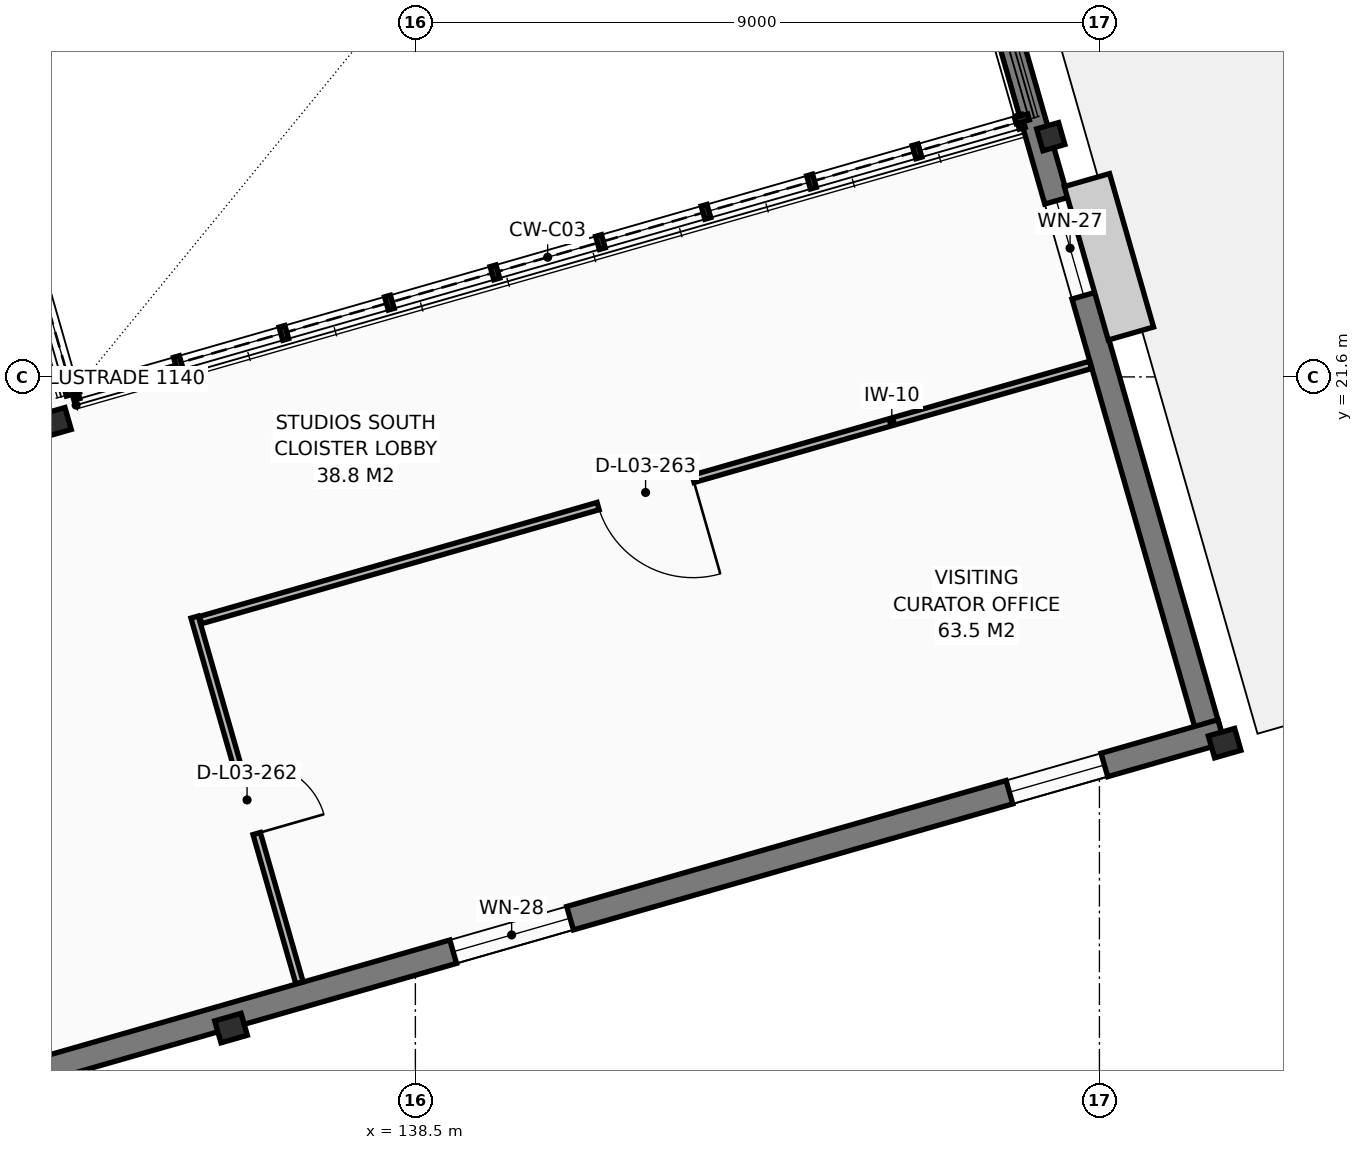
"""IFC4 building model, lengths in metres.
Left out: names, types, materials, properties, quantities, classifications, styles, units other than length and angle.
Written with IfcOpenShell. Run it as: python <this file> out.ifc"""

import sys

from ifc_helpers import new_model, si_unit, direction, frame, frame_2d, origin, origin_2d, place, context, subcontext, project, spatial, rectangle, i_section, extrude, element, fill, save


model = new_model("IFC4")
c1 = context("Model", 3, precision=1e-05, world=origin(), true_north=direction((0.0, 1.0)))
c2 = subcontext(c1, "Body", "Model", "MODEL_VIEW")
j1 = project(units=[si_unit("LENGTHUNIT", "METRE"), si_unit("PLANEANGLEUNIT", "RADIAN")], contexts=[c1])
p1 = place(None, origin())
s1 = spatial("IfcSite", under=j1, at=p1, CompositionType="ELEMENT")
p2 = place(p1, origin())
s2 = spatial("IfcBuilding", under=s1, at=p2, CompositionType="ELEMENT")
p3 = place(p2, frame((0.0, 0.0, 13.68)))
s3 = spatial("IfcBuildingStorey", under=s2, at=p3, CompositionType="ELEMENT", Elevation=13.68)
p4 = place(p3, frame((136.074, 13.033, 0.0), z_axis=(0.0, 0.0, 1.0), x_axis=(0.961261695938, 0.275637355817, 0.0)))
e1 = element("IfcColumn", 1, at=p4, inside=s3, PredefinedType="COLUMN", context=c2, shape_type="SweptSolid", body=[
    extrude(i_section(OverallWidth=0.3, OverallDepth=0.36, WebThickness=0.012, FlangeThickness=0.022, FilletRadius=0.027, at=origin_2d()), origin(), (0.0, 0.0, 1.0), 3.96),
])
p5 = place(p3, frame((133.787, 21.012, 0.0), z_axis=(0.0, 0.0, 1.0), x_axis=(0.961261695938, 0.275637355817, 0.0)))
e2 = element("IfcColumn", 2, at=p5, inside=s3, PredefinedType="COLUMN", context=c2, shape_type="SweptSolid", body=[
    extrude(i_section(OverallWidth=0.3, OverallDepth=0.3, WebThickness=0.011, FlangeThickness=0.019, FilletRadius=0.027, at=origin_2d()), origin(), (0.0, 0.0, 1.0), 3.96),
])
p6 = place(p3, frame((149.147, 16.782, 0.0), z_axis=(0.0, 0.0, 1.0), x_axis=(0.961261695938, 0.275637355817, 0.0)))
e3 = element("IfcColumn", 3, at=p6, inside=s3, PredefinedType="COLUMN", context=c2, shape_type="SweptSolid", body=[
    extrude(i_section(OverallWidth=0.3, OverallDepth=0.36, WebThickness=0.012, FlangeThickness=0.022, FilletRadius=0.027, at=origin_2d()), origin(), (0.0, 0.0, 1.0), 3.96),
])
p7 = place(p3, frame((146.86, 24.76, 0.0), z_axis=(0.0, 0.0, 1.0), x_axis=(0.961261695938, 0.275637355817, 0.0)))
e4 = element("IfcColumn", 4, at=p7, inside=s3, PredefinedType="COLUMN", context=c2, shape_type="SweptSolid", body=[
    extrude(i_section(OverallWidth=0.3, OverallDepth=0.3, WebThickness=0.011, FlangeThickness=0.019, FilletRadius=0.027, at=origin_2d()), origin(), (0.0, 0.0, 1.0), 3.96),
])
p8 = place(p3, frame((141.772, 41.923, 0.0), z_axis=(0.0, 0.0, 1.0), x_axis=(0.275633622707, -0.961262766383, 0.0)))
e5 = element("IfcWall", 5, at=p8, inside=s3, PredefinedType="SOLIDWALL", context=c2, shape_type="SweptSolid", body=[
    extrude(rectangle(XDim=26.04, YDim=0.32, at=frame_2d((13.02, 0.0))), origin(), (0.0, 0.0, 1.0), 3.72),
])
p9 = place(p8, frame((1.6, 0.0, 0.85)))
e6 = element("IfcOpeningElement", 6, at=p9, cuts=e5, PredefinedType="OPENING", context=c2, shape_type="SweptSolid", body=[
    extrude(rectangle(XDim=1.85, YDim=1.4, at=frame_2d((0.925, 0.7))), frame((0.0, 0.17, 0.0), z_axis=(0.0, -1.0, 0.0), x_axis=(1.0, 0.0, 0.0)), (0.0, 0.0, 1.0), 0.34),
])
p10 = place(p8, frame((13.02, 0.0, 0.85)))
e7 = element("IfcOpeningElement", 7, at=p10, cuts=e5, PredefinedType="OPENING", context=c2, shape_type="SweptSolid", body=[
    extrude(rectangle(XDim=2.25, YDim=1.4, at=frame_2d((1.125, 0.7))), frame((0.0, 0.17, 0.0), z_axis=(0.0, -1.0, 0.0), x_axis=(1.0, 0.0, 0.0)), (0.0, 0.0, 1.0), 0.34),
])
p11 = place(p8, frame((18.73, 0.0, 0.85)))
e8 = element("IfcOpeningElement", 8, at=p11, cuts=e5, PredefinedType="OPENING", context=c2, shape_type="SweptSolid", body=[
    extrude(rectangle(XDim=1.3, YDim=1.6, at=frame_2d((0.65, 0.8))), frame((0.0, 0.17, 0.0), z_axis=(0.0, -1.0, 0.0), x_axis=(1.0, 0.0, 0.0)), (0.0, 0.0, 1.0), 0.34),
])
p12 = place(p3, frame((149.103, 16.936, 0.0), z_axis=(0.0, 0.0, 1.0), x_axis=(-0.961262224101, -0.275635513888, 0.0)))
e9 = element("IfcWall", 9, at=p12, inside=s3, PredefinedType="SOLIDWALL", context=c2, shape_type="SweptSolid", body=[
    extrude(rectangle(XDim=25.14, YDim=0.32, at=frame_2d((12.57, 0.0))), origin(), (0.0, 0.0, 1.0), 3.72),
])
p13 = place(p12, frame((1.6, 0.0, 0.85)))
e10 = element("IfcOpeningElement", 10, at=p13, cuts=e9, PredefinedType="OPENING", context=c2, shape_type="SweptSolid", body=[
    extrude(rectangle(XDim=1.3, YDim=1.6, at=frame_2d((0.65, 0.8))), frame((0.0, 0.17, 0.0), z_axis=(0.0, -1.0, 0.0), x_axis=(1.0, 0.0, 0.0)), (0.0, 0.0, 1.0), 0.34),
])
p14 = place(p12, frame((8.913, 0.0, 0.85)))
e11 = element("IfcOpeningElement", 11, at=p14, cuts=e9, PredefinedType="OPENING", context=c2, shape_type="SweptSolid", body=[
    extrude(rectangle(XDim=1.6, YDim=1.6, at=frame_2d((0.8, 0.8))), frame((0.0, 0.17, 0.0), z_axis=(0.0, -1.0, 0.0), x_axis=(1.0, 0.0, 0.0)), (0.0, 0.0, 1.0), 0.34),
])
p15 = place(p12, frame((16.227, 0.0, 0.85)))
e12 = element("IfcOpeningElement", 12, at=p15, cuts=e9, PredefinedType="OPENING", context=c2, shape_type="SweptSolid", body=[
    extrude(rectangle(XDim=1.9, YDim=1.6, at=frame_2d((0.95, 0.8))), frame((0.0, 0.17, 0.0), z_axis=(0.0, -1.0, 0.0), x_axis=(1.0, 0.0, 0.0)), (0.0, 0.0, 1.0), 0.34),
])
p16 = place(p3, frame((135.595, 18.441, 0.0), z_axis=(0.0, 0.0, 1.0), x_axis=(0.275635629977, -0.961262190813, 0.0)))
e13 = element("IfcWall", 13, at=p16, inside=s3, PredefinedType="PARTITIONING", context=c2, shape_type="SweptSolid", body=[
    extrude(rectangle(XDim=5.006, YDim=0.1, at=frame_2d((2.503, 0.0))), origin(), (0.0, 0.0, 1.0), 3.71),
])
p17 = place(p16, frame((2.043, 0.0, 0.0)))
e14 = element("IfcOpeningElement", 14, at=p17, cuts=e13, PredefinedType="OPENING", context=c2, shape_type="SweptSolid", body=[
    extrude(rectangle(XDim=0.92, YDim=2.08, at=frame_2d((0.46, 1.04))), frame((0.0, 0.06, 0.0), z_axis=(0.0, -1.0, 0.0), x_axis=(1.0, 0.0, 0.0)), (0.0, 0.0, 1.0), 0.12),
])
p18 = place(p3, frame((147.383, 21.758, 0.0), z_axis=(0.0, 0.0, 1.0), x_axis=(-0.961263335306, -0.275631638597, 0.0)))
e15 = element("IfcWall", 15, at=p18, inside=s3, PredefinedType="PARTITIONING", context=c2, shape_type="SweptSolid", body=[
    extrude(rectangle(XDim=12.181, YDim=0.1, at=frame_2d((6.09, 0.0))), origin(), (0.0, 0.0, 1.0), 3.4),
])
p19 = place(p18, frame((5.44, 0.0, 0.0)))
e16 = element("IfcOpeningElement", 16, at=p19, cuts=e15, PredefinedType="OPENING", context=c2, shape_type="SweptSolid", body=[
    extrude(rectangle(XDim=1.3, YDim=2.15, at=frame_2d((0.65, 1.075))), frame((0.0, 0.06, 0.0), z_axis=(0.0, -1.0, 0.0), x_axis=(1.0, 0.0, 0.0)), (0.0, 0.0, 1.0), 0.12),
])
p20 = place(p11, origin())
e17 = element("IfcWindow", 17, at=p20, inside=s3, PartitioningType="SINGLE_PANEL", PredefinedType="WINDOW", context=c2, shape_type="SweptSolid", body=[
    extrude(rectangle(XDim=1.3, YDim=1.6, at=frame_2d((0.65, 0.8))), frame((0.0, 0.03, 0.0), z_axis=(0.0, -1.0, 0.0), x_axis=(1.0, 0.0, 0.0)), (0.0, 0.0, 1.0), 0.06),
])
fill(e8, e17)
p21 = place(p13, origin())
e18 = element("IfcWindow", 18, at=p21, inside=s3, PartitioningType="SINGLE_PANEL", PredefinedType="WINDOW", context=c2, shape_type="SweptSolid", body=[
    extrude(rectangle(XDim=1.3, YDim=1.6, at=frame_2d((0.65, 0.8))), frame((0.0, 0.03, 0.0), z_axis=(0.0, -1.0, 0.0), x_axis=(1.0, 0.0, 0.0)), (0.0, 0.0, 1.0), 0.06),
])
fill(e10, e18)
p22 = place(p14, origin())
e19 = element("IfcWindow", 19, at=p22, inside=s3, PartitioningType="SINGLE_PANEL", PredefinedType="WINDOW", context=c2, shape_type="SweptSolid", body=[
    extrude(rectangle(XDim=1.6, YDim=1.6, at=frame_2d((0.8, 0.8))), frame((0.0, 0.03, 0.0), z_axis=(0.0, -1.0, 0.0), x_axis=(1.0, 0.0, 0.0)), (0.0, 0.0, 1.0), 0.06),
])
fill(e11, e19)
p23 = place(p17, origin())
e20 = element("IfcDoor", 20, at=p23, inside=s3, OperationType="SINGLE_SWING_RIGHT", PredefinedType="DOOR", context=c2, shape_type="SweptSolid", body=[
    extrude(rectangle(XDim=0.92, YDim=2.08, at=frame_2d((0.46, 1.04))), frame((0.0, 0.025, 0.0), z_axis=(0.0, -1.0, 0.0), x_axis=(1.0, 0.0, 0.0)), (0.0, 0.0, 1.0), 0.05),
])
fill(e14, e20)
p24 = place(p19, origin())
e21 = element("IfcDoor", 21, at=p24, inside=s3, OperationType="SINGLE_SWING_LEFT", PredefinedType="DOOR", context=c2, shape_type="SweptSolid", body=[
    extrude(rectangle(XDim=1.3, YDim=2.15, at=frame_2d((0.65, 1.075))), frame((0.0, 0.025, 0.0), z_axis=(0.0, -1.0, 0.0), x_axis=(1.0, 0.0, 0.0)), (0.0, 0.0, 1.0), 0.05),
])
fill(e16, e21)
save(model, sys.argv[1])
